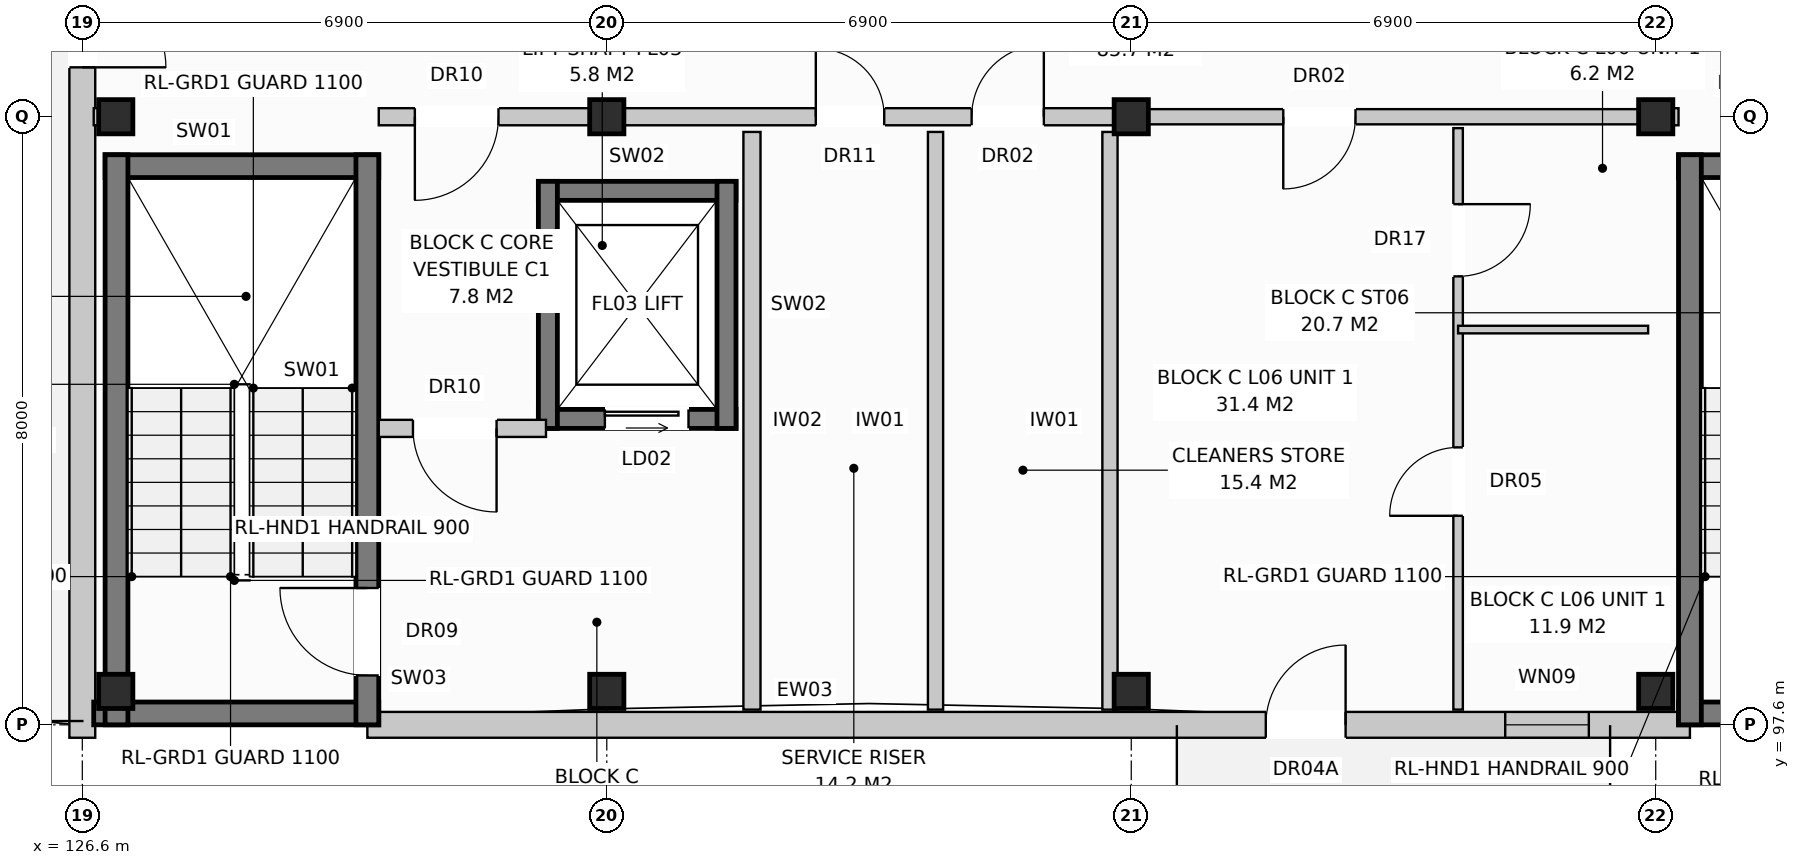
"""IFC4 building model, lengths in metres.
Left out: names, types, materials, properties, quantities, classifications, styles, units other than length and angle.
Written with IfcOpenShell. Run it as: python <this file> out.ifc"""

import sys

from ifc_helpers import new_model, si_unit, direction, frame, frame_2d, origin, origin_with_axes, origin_2d, place, context, subcontext, project, spatial, rectangle, extrude, element, fill, save


model = new_model("IFC4")
c1 = context("Model", 3, precision=1e-05, world=origin(), true_north=direction((0.0, 1.0)))
c2 = subcontext(c1, "Body", "Model", "MODEL_VIEW")
j1 = project(units=[si_unit("LENGTHUNIT", "METRE"), si_unit("PLANEANGLEUNIT", "RADIAN")], contexts=[c1])
p1 = place(None, origin())
s1 = spatial("IfcSite", under=j1, at=p1, CompositionType="ELEMENT")
p2 = place(p1, origin())
s2 = spatial("IfcBuilding", under=s1, at=p2, CompositionType="ELEMENT")
p3 = place(p2, frame((0.0, 0.0, 20.8)))
s3 = spatial("IfcBuildingStorey", under=s2, at=p3, CompositionType="ELEMENT", Elevation=20.8)
for number, where, z_axis, x_axis in (
    (1, (127.04, 98.04, 0.0), (0.0, 0.0, 1.0), (1.0, 0.0, 0.0)),
    (2, (127.04, 105.6, 0.0), (0.0, 0.0, 1.0), (1.0, 0.0, 0.0)),
    (3, (133.5, 98.04, 0.0), (0.0, 0.0, 1.0), (1.0, 0.0, 0.0)),
    (4, (133.5, 105.6, 0.0), (0.0, 0.0, 1.0), (1.0, 0.0, 0.0)),
    (5, (140.4, 98.04, 0.0), (0.0, 0.0, 1.0), (1.0, 0.0, 0.0)),
    (6, (140.4, 105.6, 0.0), (0.0, 0.0, 1.0), (1.0, 0.0, 0.0)),
    (7, (147.3, 98.04, 0.0), (0.0, 0.0, 1.0), (1.0, 0.0, 0.0)),
    (8, (147.3, 105.6, 0.0), (0.0, 0.0, 1.0), (1.0, 0.0, 0.0)),
):
    element("IfcColumn", number, at=place(p3, frame(where, z_axis=z_axis, x_axis=x_axis)), inside=s3, PredefinedType="COLUMN", context=c2, shape_type="SweptSolid", body=[
        extrude(rectangle(XDim=0.45, YDim=0.45, at=origin_2d()), origin(), (0.0, 0.0, 1.0), 3.2),
    ])
p4 = place(p3, frame((130.35, 97.6, 0.0), z_axis=(0.0, 0.0, 1.0), x_axis=(1.0, 0.0, 0.0)))
e9 = element("IfcWall", 9, at=p4, inside=s3, PredefinedType="STANDARD", context=c2, shape_type="SweptSolid", body=[
    extrude(rectangle(XDim=17.4, YDim=0.34, at=frame_2d((8.7, 0.0))), origin(), (0.0, 0.0, 1.0), 2.95),
])
p5 = place(p4, frame((11.82, 0.0, 0.0)))
e10 = element("IfcOpeningElement", 10, at=p5, cuts=e9, PredefinedType="OPENING", context=c2, shape_type="SweptSolid", body=[
    extrude(rectangle(XDim=1.05, YDim=2.12, at=frame_2d((0.525, 1.06))), frame((0.0, 0.182, 0.0), z_axis=(0.0, -1.0, 0.0), x_axis=(1.0, 0.0, 0.0)), (0.0, 0.0, 1.0), 0.364),
])
p6 = place(p4, frame((14.97, 0.0, 0.72)))
e11 = element("IfcOpeningElement", 11, at=p6, cuts=e9, PredefinedType="OPENING", context=c2, shape_type="SweptSolid", body=[
    extrude(rectangle(XDim=1.1, YDim=1.5, at=frame_2d((0.55, 0.75))), frame((0.0, 0.182, 0.0), z_axis=(0.0, -1.0, 0.0), x_axis=(1.0, 0.0, 0.0)), (0.0, 0.0, 1.0), 0.364),
])
p7 = place(p3, frame((126.6, 97.43, 0.0), z_axis=(0.0, 0.0, 1.0), x_axis=(0.0, 1.0, 0.0)))
e12 = element("IfcWall", 12, at=p7, inside=s3, PredefinedType="STANDARD", context=c2, shape_type="SweptSolid", body=[
    extrude(rectangle(XDim=18.74, YDim=0.34, at=frame_2d((9.37, 0.0))), origin(), (0.0, 0.0, 1.0), 2.95),
])
p8 = place(p7, frame((8.82, 0.0, 0.0)))
e13 = element("IfcOpeningElement", 13, at=p8, cuts=e12, PredefinedType="OPENING", context=c2, shape_type="SweptSolid", body=[
    extrude(rectangle(XDim=1.1, YDim=2.1, at=frame_2d((0.55, 1.05))), frame((0.0, 0.182, 0.0), z_axis=(0.0, -1.0, 0.0), x_axis=(1.0, 0.0, 0.0)), (0.0, 0.0, 1.0), 0.364),
])
p9 = place(p7, frame((15.82, 0.0, 0.0)))
e14 = element("IfcOpeningElement", 14, at=p9, cuts=e12, PredefinedType="OPENING", context=c2, shape_type="SweptSolid", body=[
    extrude(rectangle(XDim=1.1, YDim=2.1, at=frame_2d((0.55, 1.05))), frame((0.0, 0.182, 0.0), z_axis=(0.0, -1.0, 0.0), x_axis=(1.0, 0.0, 0.0)), (0.0, 0.0, 1.0), 0.364),
])
p10 = place(p3, frame((126.75, 97.75, 0.0), z_axis=(0.0, 0.0, 1.0), x_axis=(1.0, 0.0, 0.0)))
e15 = element("IfcWall", 15, at=p10, inside=s3, PredefinedType="SHEAR", context=c2, shape_type="SweptSolid", body=[
    extrude(rectangle(XDim=3.75, YDim=0.3, at=frame_2d((1.875, 0.0))), origin(), (0.0, 0.0, 1.0), 2.95),
])
p11 = place(p3, frame((126.9, 104.95, 0.0), z_axis=(0.0, 0.0, 1.0), x_axis=(1.0, 0.0, 0.0)))
e16 = element("IfcWall", 16, at=p11, inside=s3, PredefinedType="SHEAR", context=c2, shape_type="SweptSolid", body=[
    extrude(rectangle(XDim=3.6, YDim=0.3, at=frame_2d((1.8, 0.0))), origin(), (0.0, 0.0, 1.0), 2.95),
])
p12 = place(p3, frame((127.05, 97.6, 0.0), z_axis=(0.0, 0.0, 1.0), x_axis=(0.0, 1.0, 0.0)))
e17 = element("IfcWall", 17, at=p12, inside=s3, PredefinedType="SHEAR", context=c2, shape_type="SweptSolid", body=[
    extrude(rectangle(XDim=7.5, YDim=0.3, at=frame_2d((3.75, 0.0))), origin(), (0.0, 0.0, 1.0), 2.95),
])
p13 = place(p3, frame((130.35, 97.6, 0.0), z_axis=(0.0, 0.0, 1.0), x_axis=(0.0, 1.0, 0.0)))
e18 = element("IfcWall", 18, at=p13, inside=s3, PredefinedType="SHEAR", context=c2, shape_type="SweptSolid", body=[
    extrude(rectangle(XDim=7.5, YDim=0.3, at=frame_2d((3.75, 0.0))), origin(), (0.0, 0.0, 1.0), 2.95),
])
p14 = place(p13, frame((0.65, 0.0, 0.0)))
e19 = element("IfcOpeningElement", 19, at=p14, cuts=e18, PredefinedType="OPENING", context=c2, shape_type="SweptSolid", body=[
    extrude(rectangle(XDim=1.15, YDim=2.15, at=frame_2d((0.575, 1.075))), frame((0.0, 0.162, 0.0), z_axis=(0.0, -1.0, 0.0), x_axis=(1.0, 0.0, 0.0)), (0.0, 0.0, 1.0), 0.324),
])
p15 = place(p3, frame((132.6, 101.625, 0.0), z_axis=(0.0, 0.0, 1.0), x_axis=(1.0, 0.0, 0.0)))
e20 = element("IfcWall", 20, at=p15, inside=s3, PredefinedType="SHEAR", context=c2, shape_type="SweptSolid", body=[
    extrude(rectangle(XDim=2.6, YDim=0.25, at=frame_2d((1.3, 0.0))), origin(), (0.0, 0.0, 1.0), 2.95),
])
p16 = place(p15, frame((0.875, 0.0, 0.0)))
e21 = element("IfcOpeningElement", 21, at=p16, cuts=e20, PredefinedType="OPENING", context=c2, shape_type="SweptSolid", body=[
    extrude(rectangle(XDim=1.1, YDim=2.1, at=frame_2d((0.55, 1.05))), frame((0.0, 0.137, 0.0), z_axis=(0.0, -1.0, 0.0), x_axis=(1.0, 0.0, 0.0)), (0.0, 0.0, 1.0), 0.274),
])
p17 = place(p3, frame((132.6, 104.625, 0.0), z_axis=(0.0, 0.0, 1.0), x_axis=(1.0, 0.0, 0.0)))
e22 = element("IfcWall", 22, at=p17, inside=s3, PredefinedType="SHEAR", context=c2, shape_type="SweptSolid", body=[
    extrude(rectangle(XDim=2.6, YDim=0.25, at=frame_2d((1.3, 0.0))), origin(), (0.0, 0.0, 1.0), 2.95),
])
for number, where, z_axis, x_axis in (
    (23, (132.725, 101.5, 0.0), (0.0, 0.0, 1.0), (0.0, 1.0, 0.0)),
    (24, (135.075, 101.5, 0.0), (0.0, 0.0, 1.0), (0.0, 1.0, 0.0)),
):
    element("IfcWall", number, at=place(p3, frame(where, z_axis=z_axis, x_axis=x_axis)), inside=s3, PredefinedType="SHEAR", context=c2, shape_type="SweptSolid", body=[
        extrude(rectangle(XDim=3.25, YDim=0.25, at=frame_2d((1.625, 0.0))), origin(), (0.0, 0.0, 1.0), 2.95),
    ])
p18 = place(p3, frame((135.41, 97.8, 0.0), z_axis=(0.0, 0.0, 1.0), x_axis=(0.0, 1.0, 0.0)))
e25 = element("IfcWall", 25, at=p18, inside=s3, PredefinedType="PARTITIONING", context=c2, shape_type="SweptSolid", body=[
    extrude(rectangle(XDim=7.6, YDim=0.225, at=frame_2d((3.8, 0.0))), origin(), (0.0, 0.0, 1.0), 2.59),
])
p19 = place(p3, frame((130.5, 101.5, 0.0), z_axis=(0.0, 0.0, 1.0), x_axis=(1.0, 0.0, 0.0)))
e26 = element("IfcWall", 26, at=p19, inside=s3, PredefinedType="PARTITIONING", context=c2, shape_type="SweptSolid", body=[
    extrude(rectangle(XDim=2.2, YDim=0.225, at=frame_2d((1.1, 0.0))), origin(), (0.0, 0.0, 1.0), 2.95),
])
p20 = place(p19, frame((0.45, 0.0, 0.0)))
e27 = element("IfcOpeningElement", 27, at=p20, cuts=e26, PredefinedType="OPENING", context=c2, shape_type="SweptSolid", body=[
    extrude(rectangle(XDim=1.1, YDim=2.15, at=frame_2d((0.55, 1.075))), frame((0.0, 0.125, 0.0), z_axis=(0.0, -1.0, 0.0), x_axis=(1.0, 0.0, 0.0)), (0.0, 0.0, 1.0), 0.249),
])
p21 = place(p3, frame((126.75, 105.6, 0.0), z_axis=(0.0, 0.0, 1.0), x_axis=(1.0, 0.0, 0.0)))
e28 = element("IfcWall", 28, at=p21, inside=s3, PredefinedType="PARTITIONING", context=c2, shape_type="SweptSolid", body=[
    extrude(rectangle(XDim=0.15, YDim=0.225, at=frame_2d((0.075, 0.0))), origin(), (0.0, 0.0, 1.0), 2.95),
])
for number, where, z_axis, x_axis in (
    (29, (137.825, 97.8, 0.0), (0.0, 0.0, 1.0), (0.0, 1.0, 0.0)),
    (30, (140.12, 97.8, 0.0), (0.0, 0.0, 1.0), (0.0, 1.0, 0.0)),
):
    element("IfcWall", number, at=place(p3, frame(where, z_axis=z_axis, x_axis=x_axis)), inside=s3, PredefinedType="PARTITIONING", context=c2, shape_type="SweptSolid", body=[
        extrude(rectangle(XDim=7.6, YDim=0.2, at=frame_2d((3.8, 0.0))), origin(), (0.0, 0.0, 1.0), 2.95),
    ])
p22 = place(p3, frame((130.5, 105.6, 0.0), z_axis=(0.0, 0.0, 1.0), x_axis=(1.0, 0.0, 0.0)))
e31 = element("IfcWall", 31, at=p22, inside=s3, PredefinedType="PARTITIONING", context=c2, shape_type="SweptSolid", body=[
    extrude(rectangle(XDim=9.9, YDim=0.225, at=frame_2d((4.95, 0.0))), origin(), (0.0, 0.0, 1.0), 2.39),
])
p23 = place(p22, frame((0.475, 0.0, 0.0)))
e32 = element("IfcOpeningElement", 32, at=p23, cuts=e31, PredefinedType="OPENING", context=c2, shape_type="SweptSolid", body=[
    extrude(rectangle(XDim=1.1, YDim=2.15, at=frame_2d((0.55, 1.075))), frame((0.0, 0.125, 0.0), z_axis=(0.0, -1.0, 0.0), x_axis=(1.0, 0.0, 0.0)), (0.0, 0.0, 1.0), 0.249),
])
p24 = place(p22, frame((5.75, 0.0, 0.0)))
e33 = element("IfcOpeningElement", 33, at=p24, cuts=e31, PredefinedType="OPENING", context=c2, shape_type="SweptSolid", body=[
    extrude(rectangle(XDim=0.9, YDim=2.1, at=frame_2d((0.45, 1.05))), frame((0.0, 0.125, 0.0), z_axis=(0.0, -1.0, 0.0), x_axis=(1.0, 0.0, 0.0)), (0.0, 0.0, 1.0), 0.249),
])
p25 = place(p22, frame((7.8, 0.0, 0.0)))
e34 = element("IfcOpeningElement", 34, at=p25, cuts=e31, PredefinedType="OPENING", context=c2, shape_type="SweptSolid", body=[
    extrude(rectangle(XDim=0.95, YDim=2.15, at=frame_2d((0.475, 1.075))), frame((0.0, 0.125, 0.0), z_axis=(0.0, -1.0, 0.0), x_axis=(1.0, 0.0, 0.0)), (0.0, 0.0, 1.0), 0.249),
])
for number, where, z_axis, x_axis in (
    (35, (147.6, 97.75, 0.0), (0.0, 0.0, 1.0), (1.0, 0.0, 0.0)),
    (36, (147.6, 104.95, 0.0), (0.0, 0.0, 1.0), (1.0, 0.0, 0.0)),
):
    element("IfcWall", number, at=place(p3, frame(where, z_axis=z_axis, x_axis=x_axis)), inside=s3, PredefinedType="SHEAR", context=c2, shape_type="SweptSolid", body=[
        extrude(rectangle(XDim=3.6, YDim=0.3, at=frame_2d((1.8, 0.0))), origin(), (0.0, 0.0, 1.0), 2.95),
    ])
p26 = place(p3, frame((147.75, 97.6, 0.0), z_axis=(0.0, 0.0, 1.0), x_axis=(0.0, 1.0, 0.0)))
e37 = element("IfcWall", 37, at=p26, inside=s3, PredefinedType="SHEAR", context=c2, shape_type="SweptSolid", body=[
    extrude(rectangle(XDim=7.5, YDim=0.3, at=frame_2d((3.75, 0.0))), origin(), (0.0, 0.0, 1.0), 2.95),
])
p27 = place(p3, frame((147.3, 105.6, 0.0), z_axis=(0.0, 0.0, 1.0), x_axis=(1.0, 0.0, 0.0)))
e38 = element("IfcWall", 38, at=p27, inside=s3, PredefinedType="PARTITIONING", context=c2, shape_type="SweptSolid", body=[
    extrude(rectangle(XDim=0.3, YDim=0.225, at=frame_2d((0.15, 0.0))), origin(), (0.0, 0.0, 1.0), 2.95),
])
p28 = place(p3, frame((140.4, 105.6, 0.0), z_axis=(0.0, 0.0, 1.0), x_axis=(1.0, 0.0, 0.0)))
e39 = element("IfcWall", 39, at=p28, inside=s3, PredefinedType="PARTITIONING", context=c2, shape_type="SweptSolid", body=[
    extrude(rectangle(XDim=6.9, YDim=0.2, at=frame_2d((3.45, 0.0))), origin(), (0.0, 0.0, 1.0), 2.39),
])
p29 = place(p28, frame((2.0, 0.0, 0.0)))
e40 = element("IfcOpeningElement", 40, at=p29, cuts=e39, PredefinedType="OPENING", context=c2, shape_type="SweptSolid", body=[
    extrude(rectangle(XDim=0.95, YDim=2.15, at=frame_2d((0.475, 1.075))), frame((0.0, 0.112, 0.0), z_axis=(0.0, -1.0, 0.0), x_axis=(1.0, 0.0, 0.0)), (0.0, 0.0, 1.0), 0.224),
])
p30 = place(p3, frame((144.7, 105.45, 0.0), z_axis=(0.0, 0.0, 1.0), x_axis=(0.0, -1.0, 0.0)))
e41 = element("IfcWall", 41, at=p30, inside=s3, PredefinedType="PARTITIONING", context=c2, shape_type="SweptSolid", body=[
    extrude(rectangle(XDim=7.65, YDim=0.125, at=frame_2d((3.825, 0.0))), origin(), (0.0, 0.0, 1.0), 2.95),
])
p31 = place(p30, frame((1.0, 0.0, 0.0)))
e42 = element("IfcOpeningElement", 42, at=p31, cuts=e41, PredefinedType="OPENING", context=c2, shape_type="SweptSolid", body=[
    extrude(rectangle(XDim=0.95, YDim=2.1, at=frame_2d((0.475, 1.05))), frame((0.0, 0.074, 0.0), z_axis=(0.0, -1.0, 0.0), x_axis=(1.0, 0.0, 0.0)), (0.0, 0.0, 1.0), 0.149),
])
p32 = place(p30, frame((4.2, 0.0, 0.0)))
e43 = element("IfcOpeningElement", 43, at=p32, cuts=e41, PredefinedType="OPENING", context=c2, shape_type="SweptSolid", body=[
    extrude(rectangle(XDim=0.9, YDim=2.1, at=frame_2d((0.45, 1.05))), frame((0.0, 0.074, 0.0), z_axis=(0.0, -1.0, 0.0), x_axis=(1.0, 0.0, 0.0)), (0.0, 0.0, 1.0), 0.149),
])
p33 = place(p3, frame((144.7, 102.8, 0.0), z_axis=(0.0, 0.0, 1.0), x_axis=(1.0, 0.0, 0.0)))
e44 = element("IfcWall", 44, at=p33, inside=s3, PredefinedType="PARTITIONING", context=c2, shape_type="SweptSolid", body=[
    extrude(rectangle(XDim=2.5, YDim=0.1, at=frame_2d((1.25, 0.0))), origin(), (0.0, 0.0, 1.0), 2.95),
])
p34 = place(p5, origin_with_axes())
e45 = element("IfcDoor", 45, at=p34, inside=s3, OperationType="SINGLE_SWING_RIGHT", PredefinedType="DOOR", context=c2, shape_type="SweptSolid", body=[
    extrude(rectangle(XDim=1.05, YDim=2.12, at=frame_2d((0.525, 1.06))), frame((0.0, 0.025, 0.0), z_axis=(0.0, -1.0, 0.0), x_axis=(1.0, 0.0, 0.0)), (0.0, 0.0, 1.0), 0.05),
])
fill(e10, e45)
p35 = place(p6, origin_with_axes())
e46 = element("IfcWindow", 46, at=p35, inside=s3, PartitioningType="SINGLE_PANEL", PredefinedType="WINDOW", context=c2, shape_type="SweptSolid", body=[
    extrude(rectangle(XDim=1.1, YDim=1.5, at=frame_2d((0.55, 0.75))), frame((0.0, 0.03, 0.0), z_axis=(0.0, -1.0, 0.0), x_axis=(1.0, 0.0, 0.0)), (0.0, 0.0, 1.0), 0.06),
])
fill(e11, e46)
p36 = place(p8, frame((1.1, 0.0, 0.0), z_axis=(0.0, 0.0, 1.0), x_axis=(-1.0, 0.0, 0.0)))
e47 = element("IfcDoor", 47, at=p36, inside=s3, OperationType="SINGLE_SWING_LEFT", PredefinedType="DOOR", context=c2, shape_type="SweptSolid", body=[
    extrude(rectangle(XDim=1.1, YDim=2.1, at=frame_2d((0.55, 1.05))), frame((0.0, 0.025, 0.0), z_axis=(0.0, -1.0, 0.0), x_axis=(1.0, 0.0, 0.0)), (0.0, 0.0, 1.0), 0.05),
])
fill(e13, e47)
p37 = place(p14, origin_with_axes())
e48 = element("IfcDoor", 48, at=p37, inside=s3, OperationType="SINGLE_SWING_RIGHT", PredefinedType="DOOR", context=c2, shape_type="SweptSolid", body=[
    extrude(rectangle(XDim=1.15, YDim=2.15, at=frame_2d((0.575, 1.075))), frame((0.0, 0.025, 0.0), z_axis=(0.0, -1.0, 0.0), x_axis=(1.0, 0.0, 0.0)), (0.0, 0.0, 1.0), 0.05),
])
fill(e19, e48)
p38 = place(p16, origin_with_axes())
e49 = element("IfcDoor", 49, at=p38, inside=s3, OperationType="SLIDING_TO_LEFT", PredefinedType="DOOR", context=c2, shape_type="SweptSolid", body=[
    extrude(rectangle(XDim=1.1, YDim=2.1, at=frame_2d((0.55, 1.05))), frame((0.0, 0.025, 0.0), z_axis=(0.0, -1.0, 0.0), x_axis=(1.0, 0.0, 0.0)), (0.0, 0.0, 1.0), 0.05),
])
fill(e21, e49)
p39 = place(p20, frame((1.1, 0.0, 0.0), z_axis=(0.0, 0.0, 1.0), x_axis=(-1.0, 0.0, 0.0)))
e50 = element("IfcDoor", 50, at=p39, inside=s3, OperationType="SINGLE_SWING_RIGHT", PredefinedType="DOOR", context=c2, shape_type="SweptSolid", body=[
    extrude(rectangle(XDim=1.1, YDim=2.15, at=frame_2d((0.55, 1.075))), frame((0.0, 0.025, 0.0), z_axis=(0.0, -1.0, 0.0), x_axis=(1.0, 0.0, 0.0)), (0.0, 0.0, 1.0), 0.05),
])
fill(e27, e50)
p40 = place(p23, frame((1.1, 0.0, 0.0), z_axis=(0.0, 0.0, 1.0), x_axis=(-1.0, 0.0, 0.0)))
e51 = element("IfcDoor", 51, at=p40, inside=s3, OperationType="SINGLE_SWING_LEFT", PredefinedType="DOOR", context=c2, shape_type="SweptSolid", body=[
    extrude(rectangle(XDim=1.1, YDim=2.15, at=frame_2d((0.55, 1.075))), frame((0.0, 0.025, 0.0), z_axis=(0.0, -1.0, 0.0), x_axis=(1.0, 0.0, 0.0)), (0.0, 0.0, 1.0), 0.05),
])
fill(e32, e51)
p41 = place(p24, origin_with_axes())
e52 = element("IfcDoor", 52, at=p41, inside=s3, OperationType="SINGLE_SWING_LEFT", PredefinedType="DOOR", context=c2, shape_type="SweptSolid", body=[
    extrude(rectangle(XDim=0.9, YDim=2.1, at=frame_2d((0.45, 1.05))), frame((0.0, 0.025, 0.0), z_axis=(0.0, -1.0, 0.0), x_axis=(1.0, 0.0, 0.0)), (0.0, 0.0, 1.0), 0.05),
])
fill(e33, e52)
p42 = place(p25, origin_with_axes())
e53 = element("IfcDoor", 53, at=p42, inside=s3, OperationType="SINGLE_SWING_RIGHT", PredefinedType="DOOR", context=c2, shape_type="SweptSolid", body=[
    extrude(rectangle(XDim=0.95, YDim=2.15, at=frame_2d((0.475, 1.075))), frame((0.0, 0.025, 0.0), z_axis=(0.0, -1.0, 0.0), x_axis=(1.0, 0.0, 0.0)), (0.0, 0.0, 1.0), 0.05),
])
fill(e34, e53)
p43 = place(p29, frame((0.95, 0.0, 0.0), z_axis=(0.0, 0.0, 1.0), x_axis=(-1.0, 0.0, 0.0)))
e54 = element("IfcDoor", 54, at=p43, inside=s3, OperationType="SINGLE_SWING_LEFT", PredefinedType="DOOR", context=c2, shape_type="SweptSolid", body=[
    extrude(rectangle(XDim=0.95, YDim=2.15, at=frame_2d((0.475, 1.075))), frame((0.0, 0.025, 0.0), z_axis=(0.0, -1.0, 0.0), x_axis=(1.0, 0.0, 0.0)), (0.0, 0.0, 1.0), 0.05),
])
fill(e40, e54)
p44 = place(p31, origin_with_axes())
e55 = element("IfcDoor", 55, at=p44, inside=s3, OperationType="SINGLE_SWING_LEFT", PredefinedType="DOOR", context=c2, shape_type="SweptSolid", body=[
    extrude(rectangle(XDim=0.95, YDim=2.1, at=frame_2d((0.475, 1.05))), frame((0.0, 0.025, 0.0), z_axis=(0.0, -1.0, 0.0), x_axis=(1.0, 0.0, 0.0)), (0.0, 0.0, 1.0), 0.05),
])
fill(e42, e55)
p45 = place(p32, frame((0.9, 0.0, 0.0), z_axis=(0.0, 0.0, 1.0), x_axis=(-1.0, 0.0, 0.0)))
e56 = element("IfcDoor", 56, at=p45, inside=s3, OperationType="SINGLE_SWING_RIGHT", PredefinedType="DOOR", context=c2, shape_type="SweptSolid", body=[
    extrude(rectangle(XDim=0.9, YDim=2.1, at=frame_2d((0.45, 1.05))), frame((0.0, 0.025, 0.0), z_axis=(0.0, -1.0, 0.0), x_axis=(1.0, 0.0, 0.0)), (0.0, 0.0, 1.0), 0.05),
])
fill(e43, e56)
save(model, sys.argv[1])
